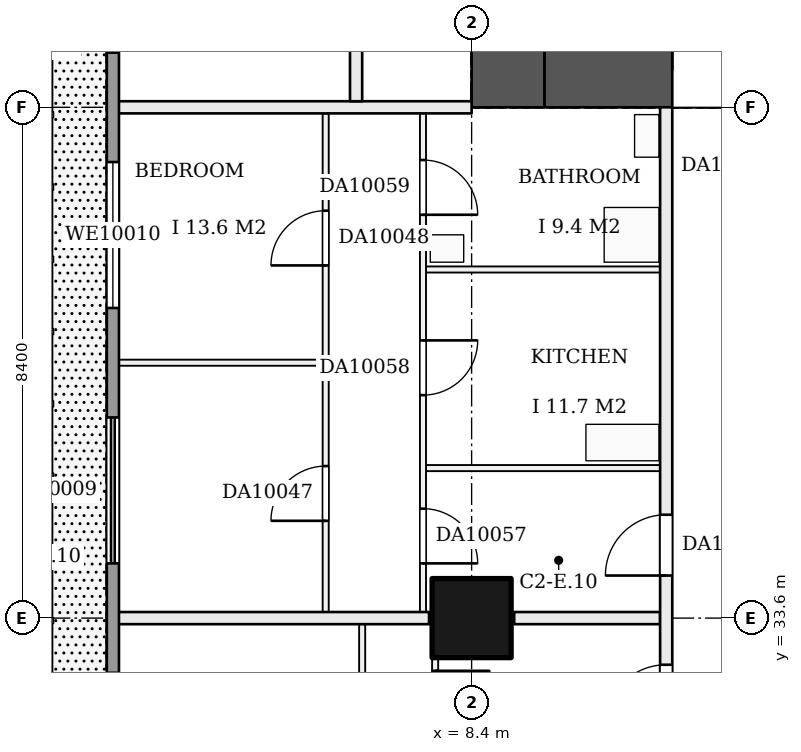
"""IFC4 building model, lengths in metres.
Left out: names, types, materials, properties, quantities, classifications, styles, units other than length and angle.
Written with IfcOpenShell. Run it as: python <this file> out.ifc"""

import sys

from ifc_helpers import new_model, si_unit, direction, frame, frame_2d, origin, origin_2d, place, context, subcontext, project, spatial, rectangle, extrude, element, fill, save


model = new_model("IFC4")
c1 = context("Model", 3, precision=1e-05, world=origin(), true_north=direction((0.0, 1.0)))
c2 = subcontext(c1, "Body", "Model", "MODEL_VIEW")
j1 = project(units=[si_unit("LENGTHUNIT", "METRE"), si_unit("PLANEANGLEUNIT", "RADIAN")], contexts=[c1])
p1 = place(None, origin())
s1 = spatial("IfcSite", under=j1, at=p1, CompositionType="ELEMENT")
p2 = place(p1, origin())
s2 = spatial("IfcBuilding", under=s1, at=p2, CompositionType="ELEMENT")
p3 = place(p2, frame((0.0, 0.0, 46.2)))
s3 = spatial("IfcBuildingStorey", under=s2, at=p3, CompositionType="ELEMENT", Elevation=46.2)
p4 = place(p3, frame((8.4, 33.6, 0.0), z_axis=(0.0, 0.0, 1.0), x_axis=(1.0, 0.0, 0.0)))
e1 = element("IfcColumn", 1, at=p4, inside=s3, PredefinedType="COLUMN", context=c2, shape_type="SweptSolid", body=[
    extrude(rectangle(XDim=1.3, YDim=1.3, at=origin_2d()), origin(), (0.0, 0.0, 1.0), 3.22),
])
p5 = place(p3, frame((9.0, 58.8, 0.0), z_axis=(0.0, 0.0, 1.0), x_axis=(0.0, -1.0, 0.0)))
e2 = element("IfcWall", 2, at=p5, inside=s3, PredefinedType="SHEAR", context=c2, shape_type="SweptSolid", body=[
    extrude(rectangle(XDim=16.8, YDim=1.2, at=frame_2d((8.4, 0.0))), origin(), (0.0, 0.0, 1.0), 3.22),
])
p6 = place(p5, frame((3.1, 0.0, 0.0)))
e3 = element("IfcOpeningElement", 3, at=p6, cuts=e2, PredefinedType="OPENING", context=c2, shape_type="SweptSolid", body=[
    extrude(rectangle(XDim=1.0, YDim=2.1, at=frame_2d((0.5, 1.05))), frame((0.0, 0.61, 0.0), z_axis=(0.0, -1.0, 0.0), x_axis=(1.0, 0.0, 0.0)), (0.0, 0.0, 1.0), 1.22),
])
p7 = place(p5, frame((12.7, 0.0, 0.0)))
e4 = element("IfcOpeningElement", 4, at=p7, cuts=e2, PredefinedType="OPENING", context=c2, shape_type="SweptSolid", body=[
    extrude(rectangle(XDim=1.0, YDim=2.1, at=frame_2d((0.5, 1.05))), frame((0.0, 0.61, 0.0), z_axis=(0.0, -1.0, 0.0), x_axis=(1.0, 0.0, 0.0)), (0.0, 0.0, 1.0), 1.22),
])
p8 = place(p3, frame((9.6, 42.6, 0.0), z_axis=(0.0, 0.0, 1.0), x_axis=(1.0, 0.0, 0.0)))
e5 = element("IfcWall", 5, at=p8, inside=s3, PredefinedType="SHEAR", context=c2, shape_type="SweptSolid", body=[
    extrude(rectangle(XDim=14.4, YDim=1.2, at=frame_2d((7.2, 0.0))), origin(), (0.0, 0.0, 1.0), 3.22),
])
p9 = place(p8, frame((2.1, 0.0, 0.0)))
e6 = element("IfcOpeningElement", 6, at=p9, cuts=e5, PredefinedType="OPENING", context=c2, shape_type="SweptSolid", body=[
    extrude(rectangle(XDim=1.8, YDim=2.1, at=frame_2d((0.9, 1.05))), frame((0.0, 0.61, 0.0), z_axis=(0.0, -1.0, 0.0), x_axis=(1.0, 0.0, 0.0)), (0.0, 0.0, 1.0), 1.22),
])
p10 = place(p3, frame((2.5, 33.6, 0.0), z_axis=(0.0, 0.0, 1.0), x_axis=(1.0, 0.0, 0.0)))
e7 = element("IfcWall", 7, at=p10, inside=s3, PredefinedType="PARTITIONING", context=c2, shape_type="SweptSolid", body=[
    extrude(rectangle(XDim=5.2, YDim=0.2, at=frame_2d((2.6, 0.0))), origin(), (0.0, 0.0, 1.0), 3.22),
])
p11 = place(p3, frame((9.1, 33.6, 0.0), z_axis=(0.0, 0.0, 1.0), x_axis=(1.0, 0.0, 0.0)))
e8 = element("IfcWall", 8, at=p11, inside=s3, PredefinedType="PARTITIONING", context=c2, shape_type="SweptSolid", body=[
    extrude(rectangle(XDim=2.4, YDim=0.2, at=frame_2d((1.2, 0.0))), origin(), (0.0, 0.0, 1.0), 3.22),
])
p12 = place(p3, frame((7.65, 36.067, 0.0), z_axis=(0.0, 0.0, 1.0), x_axis=(1.0, 0.0, 0.0)))
e9 = element("IfcWall", 9, at=p12, inside=s3, PredefinedType="PARTITIONING", context=c2, shape_type="SweptSolid", body=[
    extrude(rectangle(XDim=3.85, YDim=0.1, at=frame_2d((1.925, 0.0))), origin(), (0.0, 0.0, 1.0), 3.22),
])
p13 = place(p3, frame((2.5, 37.8, 0.0), z_axis=(0.0, 0.0, 1.0), x_axis=(1.0, 0.0, 0.0)))
e10 = element("IfcWall", 10, at=p13, inside=s3, PredefinedType="PARTITIONING", context=c2, shape_type="SweptSolid", body=[
    extrude(rectangle(XDim=3.45, YDim=0.1, at=frame_2d((1.725, 0.0))), origin(), (0.0, 0.0, 1.0), 3.22),
])
p14 = place(p3, frame((7.65, 39.333, 0.0), z_axis=(0.0, 0.0, 1.0), x_axis=(1.0, 0.0, 0.0)))
e11 = element("IfcWall", 11, at=p14, inside=s3, PredefinedType="PARTITIONING", context=c2, shape_type="SweptSolid", body=[
    extrude(rectangle(XDim=3.85, YDim=0.1, at=frame_2d((1.925, 0.0))), origin(), (0.0, 0.0, 1.0), 3.22),
])
p15 = place(p3, frame((2.5, 42.0, 0.0), z_axis=(0.0, 0.0, 1.0), x_axis=(1.0, 0.0, 0.0)))
e12 = element("IfcWall", 12, at=p15, inside=s3, PredefinedType="PARTITIONING", context=c2, shape_type="SweptSolid", body=[
    extrude(rectangle(XDim=5.9, YDim=0.2, at=frame_2d((2.95, 0.0))), origin(), (0.0, 0.0, 1.0), 3.22),
])
p16 = place(p3, frame((6.0, 33.7, 0.0), z_axis=(0.0, 0.0, 1.0), x_axis=(0.0, 1.0, 0.0)))
e13 = element("IfcWall", 13, at=p16, inside=s3, PredefinedType="PARTITIONING", context=c2, shape_type="SweptSolid", body=[
    extrude(rectangle(XDim=8.2, YDim=0.1, at=frame_2d((4.1, 0.0))), origin(), (0.0, 0.0, 1.0), 3.22),
])
p17 = place(p16, frame((1.5, 0.0, 0.0)))
e14 = element("IfcOpeningElement", 14, at=p17, cuts=e13, PredefinedType="OPENING", context=c2, shape_type="SweptSolid", body=[
    extrude(rectangle(XDim=0.9, YDim=2.1, at=frame_2d((0.45, 1.05))), frame((0.0, 0.06, 0.0), z_axis=(0.0, -1.0, 0.0), x_axis=(1.0, 0.0, 0.0)), (0.0, 0.0, 1.0), 0.12),
])
p18 = place(p16, frame((5.7, 0.0, 0.0)))
e15 = element("IfcOpeningElement", 15, at=p18, cuts=e13, PredefinedType="OPENING", context=c2, shape_type="SweptSolid", body=[
    extrude(rectangle(XDim=0.9, YDim=2.1, at=frame_2d((0.45, 1.05))), frame((0.0, 0.06, 0.0), z_axis=(0.0, -1.0, 0.0), x_axis=(1.0, 0.0, 0.0)), (0.0, 0.0, 1.0), 0.12),
])
p19 = place(p3, frame((6.5, 42.1, 0.0), z_axis=(0.0, 0.0, 1.0), x_axis=(0.0, 1.0, 0.0)))
e16 = element("IfcWall", 16, at=p19, inside=s3, PredefinedType="PARTITIONING", context=c2, shape_type="SweptSolid", body=[
    extrude(rectangle(XDim=14.2, YDim=0.2, at=frame_2d((7.1, 0.0))), origin(), (0.0, 0.0, 1.0), 3.22),
])
p20 = place(p19, frame((1.5, 0.0, 0.0)))
e17 = element("IfcOpeningElement", 17, at=p20, cuts=e16, PredefinedType="OPENING", context=c2, shape_type="SweptSolid", body=[
    extrude(rectangle(XDim=1.0, YDim=2.1, at=frame_2d((0.5, 1.05))), frame((0.0, 0.11, 0.0), z_axis=(0.0, -1.0, 0.0), x_axis=(1.0, 0.0, 0.0)), (0.0, 0.0, 1.0), 0.22),
])
p21 = place(p19, frame((6.7, 0.0, 0.0)))
e18 = element("IfcOpeningElement", 18, at=p21, cuts=e16, PredefinedType="OPENING", context=c2, shape_type="SweptSolid", body=[
    extrude(rectangle(XDim=1.0, YDim=2.1, at=frame_2d((0.5, 1.05))), frame((0.0, 0.11, 0.0), z_axis=(0.0, -1.0, 0.0), x_axis=(1.0, 0.0, 0.0)), (0.0, 0.0, 1.0), 0.22),
])
p22 = place(p3, frame((6.6, 25.3, 0.0), z_axis=(0.0, 0.0, 1.0), x_axis=(0.0, 1.0, 0.0)))
e19 = element("IfcWall", 19, at=p22, inside=s3, PredefinedType="PARTITIONING", context=c2, shape_type="SweptSolid", body=[
    extrude(rectangle(XDim=8.2, YDim=0.1, at=frame_2d((4.1, 0.0))), origin(), (0.0, 0.0, 1.0), 3.22),
])
p23 = place(p22, frame((1.5, 0.0, 0.0)))
e20 = element("IfcOpeningElement", 20, at=p23, cuts=e19, PredefinedType="OPENING", context=c2, shape_type="SweptSolid", body=[
    extrude(rectangle(XDim=0.9, YDim=2.1, at=frame_2d((0.45, 1.05))), frame((0.0, 0.06, 0.0), z_axis=(0.0, -1.0, 0.0), x_axis=(1.0, 0.0, 0.0)), (0.0, 0.0, 1.0), 0.12),
])
p24 = place(p22, frame((5.7, 0.0, 0.0)))
e21 = element("IfcOpeningElement", 21, at=p24, cuts=e19, PredefinedType="OPENING", context=c2, shape_type="SweptSolid", body=[
    extrude(rectangle(XDim=0.9, YDim=2.1, at=frame_2d((0.45, 1.05))), frame((0.0, 0.06, 0.0), z_axis=(0.0, -1.0, 0.0), x_axis=(1.0, 0.0, 0.0)), (0.0, 0.0, 1.0), 0.12),
])
p25 = place(p3, frame((7.6, 33.7, 0.0), z_axis=(0.0, 0.0, 1.0), x_axis=(0.0, 1.0, 0.0)))
e22 = element("IfcWall", 22, at=p25, inside=s3, PredefinedType="PARTITIONING", context=c2, shape_type="SweptSolid", body=[
    extrude(rectangle(XDim=8.2, YDim=0.1, at=frame_2d((4.1, 0.0))), origin(), (0.0, 0.0, 1.0), 3.22),
])
p26 = place(p25, frame((0.8, 0.0, 0.0)))
e23 = element("IfcOpeningElement", 23, at=p26, cuts=e22, PredefinedType="OPENING", context=c2, shape_type="SweptSolid", body=[
    extrude(rectangle(XDim=0.9, YDim=2.1, at=frame_2d((0.45, 1.05))), frame((0.0, 0.06, 0.0), z_axis=(0.0, -1.0, 0.0), x_axis=(1.0, 0.0, 0.0)), (0.0, 0.0, 1.0), 0.12),
])
p27 = place(p25, frame((3.567, 0.0, 0.0)))
e24 = element("IfcOpeningElement", 24, at=p27, cuts=e22, PredefinedType="OPENING", context=c2, shape_type="SweptSolid", body=[
    extrude(rectangle(XDim=0.9, YDim=2.1, at=frame_2d((0.45, 1.05))), frame((0.0, 0.06, 0.0), z_axis=(0.0, -1.0, 0.0), x_axis=(1.0, 0.0, 0.0)), (0.0, 0.0, 1.0), 0.12),
])
p28 = place(p25, frame((6.533, 0.0, 0.0)))
e25 = element("IfcOpeningElement", 25, at=p28, cuts=e22, PredefinedType="OPENING", context=c2, shape_type="SweptSolid", body=[
    extrude(rectangle(XDim=0.9, YDim=2.1, at=frame_2d((0.45, 1.05))), frame((0.0, 0.06, 0.0), z_axis=(0.0, -1.0, 0.0), x_axis=(1.0, 0.0, 0.0)), (0.0, 0.0, 1.0), 0.12),
])
p29 = place(p3, frame((7.8, 25.3, 0.0), z_axis=(0.0, 0.0, 1.0), x_axis=(0.0, 1.0, 0.0)))
e26 = element("IfcWall", 26, at=p29, inside=s3, PredefinedType="PARTITIONING", context=c2, shape_type="SweptSolid", body=[
    extrude(rectangle(XDim=8.2, YDim=0.1, at=frame_2d((4.1, 0.0))), origin(), (0.0, 0.0, 1.0), 3.22),
])
p30 = place(p29, frame((6.533, 0.0, 0.0)))
e27 = element("IfcOpeningElement", 27, at=p30, cuts=e26, PredefinedType="OPENING", context=c2, shape_type="SweptSolid", body=[
    extrude(rectangle(XDim=0.9, YDim=2.1, at=frame_2d((0.45, 1.05))), frame((0.0, 0.06, 0.0), z_axis=(0.0, -1.0, 0.0), x_axis=(1.0, 0.0, 0.0)), (0.0, 0.0, 1.0), 0.12),
])
p31 = place(p29, frame((0.8, 0.0, 0.0)))
e28 = element("IfcOpeningElement", 28, at=p31, cuts=e26, PredefinedType="OPENING", context=c2, shape_type="SweptSolid", body=[
    extrude(rectangle(XDim=0.9, YDim=2.1, at=frame_2d((0.45, 1.05))), frame((0.0, 0.06, 0.0), z_axis=(0.0, -1.0, 0.0), x_axis=(1.0, 0.0, 0.0)), (0.0, 0.0, 1.0), 0.12),
])
p32 = place(p29, frame((3.767, 0.0, 0.0)))
e29 = element("IfcOpeningElement", 29, at=p32, cuts=e26, PredefinedType="OPENING", context=c2, shape_type="SweptSolid", body=[
    extrude(rectangle(XDim=0.9, YDim=2.1, at=frame_2d((0.45, 1.05))), frame((0.0, 0.06, 0.0), z_axis=(0.0, -1.0, 0.0), x_axis=(1.0, 0.0, 0.0)), (0.0, 0.0, 1.0), 0.12),
])
p33 = place(p3, frame((11.6, 11.7, 0.0), z_axis=(0.0, 0.0, 1.0), x_axis=(0.0, 1.0, 0.0)))
e30 = element("IfcWall", 30, at=p33, inside=s3, PredefinedType="PARTITIONING", context=c2, shape_type="SweptSolid", body=[
    extrude(rectangle(XDim=30.3, YDim=0.2, at=frame_2d((15.15, 0.0))), origin(), (0.0, 0.0, 1.0), 3.22),
])
p34 = place(p33, frame((7.3, 0.0, 0.0)))
e31 = element("IfcOpeningElement", 31, at=p34, cuts=e30, PredefinedType="OPENING", context=c2, shape_type="SweptSolid", body=[
    extrude(rectangle(XDim=1.0, YDim=2.1, at=frame_2d((0.5, 1.05))), frame((0.0, 0.11, 0.0), z_axis=(0.0, -1.0, 0.0), x_axis=(1.0, 0.0, 0.0)), (0.0, 0.0, 1.0), 0.22),
])
p35 = place(p33, frame((20.133, 0.0, 0.0)))
e32 = element("IfcOpeningElement", 32, at=p35, cuts=e30, PredefinedType="OPENING", context=c2, shape_type="SweptSolid", body=[
    extrude(rectangle(XDim=1.0, YDim=2.1, at=frame_2d((0.5, 1.05))), frame((0.0, 0.11, 0.0), z_axis=(0.0, -1.0, 0.0), x_axis=(1.0, 0.0, 0.0)), (0.0, 0.0, 1.0), 0.22),
])
p36 = place(p33, frame((22.6, 0.0, 0.0)))
e33 = element("IfcOpeningElement", 33, at=p36, cuts=e30, PredefinedType="OPENING", context=c2, shape_type="SweptSolid", body=[
    extrude(rectangle(XDim=1.0, YDim=2.1, at=frame_2d((0.5, 1.05))), frame((0.0, 0.11, 0.0), z_axis=(0.0, -1.0, 0.0), x_axis=(1.0, 0.0, 0.0)), (0.0, 0.0, 1.0), 0.22),
])
p37 = place(p3, frame((2.5, 53.8, 0.0), z_axis=(0.0, 0.0, 1.0), x_axis=(0.0, -1.0, 0.0)))
e34 = element("IfcWall", 34, at=p37, inside=s3, PredefinedType="SOLIDWALL", context=c2, shape_type="SweptSolid", body=[
    extrude(rectangle(XDim=48.8, YDim=0.2, at=frame_2d((24.4, 0.0))), origin(), (0.0, 0.0, 1.0), 3.22),
])
p38 = place(p37, frame((46.1, 0.0, 0.0)))
e35 = element("IfcOpeningElement", 35, at=p38, cuts=e34, PredefinedType="OPENING", context=c2, shape_type="SweptSolid", body=[
    extrude(rectangle(XDim=2.4, YDim=2.2, at=frame_2d((1.2, 1.1))), frame((0.0, 0.11, 0.0), z_axis=(0.0, -1.0, 0.0), x_axis=(1.0, 0.0, 0.0)), (0.0, 0.0, 1.0), 0.22),
])
p39 = place(p37, frame((42.1, 0.0, 0.0)))
e36 = element("IfcOpeningElement", 36, at=p39, cuts=e34, PredefinedType="OPENING", context=c2, shape_type="SweptSolid", body=[
    extrude(rectangle(XDim=2.4, YDim=2.2, at=frame_2d((1.2, 1.1))), frame((0.0, 0.11, 0.0), z_axis=(0.0, -1.0, 0.0), x_axis=(1.0, 0.0, 0.0)), (0.0, 0.0, 1.0), 0.22),
])
p40 = place(p37, frame((37.9, 0.0, 0.0)))
e37 = element("IfcOpeningElement", 37, at=p40, cuts=e34, PredefinedType="OPENING", context=c2, shape_type="SweptSolid", body=[
    extrude(rectangle(XDim=2.4, YDim=2.2, at=frame_2d((1.2, 1.1))), frame((0.0, 0.11, 0.0), z_axis=(0.0, -1.0, 0.0), x_axis=(1.0, 0.0, 0.0)), (0.0, 0.0, 1.0), 0.22),
])
p41 = place(p37, frame((33.7, 0.0, 0.0)))
e38 = element("IfcOpeningElement", 38, at=p41, cuts=e34, PredefinedType="OPENING", context=c2, shape_type="SweptSolid", body=[
    extrude(rectangle(XDim=2.4, YDim=2.2, at=frame_2d((1.2, 1.1))), frame((0.0, 0.11, 0.0), z_axis=(0.0, -1.0, 0.0), x_axis=(1.0, 0.0, 0.0)), (0.0, 0.0, 1.0), 0.22),
])
p42 = place(p37, frame((29.5, 0.0, 0.9)))
e39 = element("IfcOpeningElement", 39, at=p42, cuts=e34, PredefinedType="OPENING", context=c2, shape_type="SweptSolid", body=[
    extrude(rectangle(XDim=2.4, YDim=1.5, at=frame_2d((1.2, 0.75))), frame((0.0, 0.11, 0.0), z_axis=(0.0, -1.0, 0.0), x_axis=(1.0, 0.0, 0.0)), (0.0, 0.0, 1.0), 0.22),
])
p43 = place(p37, frame((25.3, 0.0, 0.9)))
e40 = element("IfcOpeningElement", 40, at=p43, cuts=e34, PredefinedType="OPENING", context=c2, shape_type="SweptSolid", body=[
    extrude(rectangle(XDim=2.4, YDim=1.5, at=frame_2d((1.2, 0.75))), frame((0.0, 0.11, 0.0), z_axis=(0.0, -1.0, 0.0), x_axis=(1.0, 0.0, 0.0)), (0.0, 0.0, 1.0), 0.22),
])
p44 = place(p37, frame((21.1, 0.0, 0.0)))
e41 = element("IfcOpeningElement", 41, at=p44, cuts=e34, PredefinedType="OPENING", context=c2, shape_type="SweptSolid", body=[
    extrude(rectangle(XDim=2.4, YDim=2.2, at=frame_2d((1.2, 1.1))), frame((0.0, 0.11, 0.0), z_axis=(0.0, -1.0, 0.0), x_axis=(1.0, 0.0, 0.0)), (0.0, 0.0, 1.0), 0.22),
])
p45 = place(p37, frame((16.9, 0.0, 0.0)))
e42 = element("IfcOpeningElement", 42, at=p45, cuts=e34, PredefinedType="OPENING", context=c2, shape_type="SweptSolid", body=[
    extrude(rectangle(XDim=2.4, YDim=2.2, at=frame_2d((1.2, 1.1))), frame((0.0, 0.11, 0.0), z_axis=(0.0, -1.0, 0.0), x_axis=(1.0, 0.0, 0.0)), (0.0, 0.0, 1.0), 0.22),
])
p46 = place(p37, frame((12.7, 0.0, 0.9)))
e43 = element("IfcOpeningElement", 43, at=p46, cuts=e34, PredefinedType="OPENING", context=c2, shape_type="SweptSolid", body=[
    extrude(rectangle(XDim=2.4, YDim=1.5, at=frame_2d((1.2, 0.75))), frame((0.0, 0.11, 0.0), z_axis=(0.0, -1.0, 0.0), x_axis=(1.0, 0.0, 0.0)), (0.0, 0.0, 1.0), 0.22),
])
p47 = place(p37, frame((8.5, 0.0, 0.9)))
e44 = element("IfcOpeningElement", 44, at=p47, cuts=e34, PredefinedType="OPENING", context=c2, shape_type="SweptSolid", body=[
    extrude(rectangle(XDim=2.4, YDim=1.5, at=frame_2d((1.2, 0.75))), frame((0.0, 0.11, 0.0), z_axis=(0.0, -1.0, 0.0), x_axis=(1.0, 0.0, 0.0)), (0.0, 0.0, 1.0), 0.22),
])
p48 = place(p37, frame((4.3, 0.0, 0.9)))
e45 = element("IfcOpeningElement", 45, at=p48, cuts=e34, PredefinedType="OPENING", context=c2, shape_type="SweptSolid", body=[
    extrude(rectangle(XDim=2.4, YDim=1.5, at=frame_2d((1.2, 0.75))), frame((0.0, 0.11, 0.0), z_axis=(0.0, -1.0, 0.0), x_axis=(1.0, 0.0, 0.0)), (0.0, 0.0, 1.0), 0.22),
])
p49 = place(p37, frame((0.3, 0.0, 0.0)))
e46 = element("IfcOpeningElement", 46, at=p49, cuts=e34, PredefinedType="OPENING", context=c2, shape_type="SweptSolid", body=[
    extrude(rectangle(XDim=2.4, YDim=2.2, at=frame_2d((1.2, 1.1))), frame((0.0, 0.11, 0.0), z_axis=(0.0, -1.0, 0.0), x_axis=(1.0, 0.0, 0.0)), (0.0, 0.0, 1.0), 0.22),
])
p50 = place(p9, origin())
e47 = element("IfcDoor", 47, at=p50, inside=s3, OperationType="DOUBLE_DOOR_SINGLE_SWING", PredefinedType="DOOR", context=c2, shape_type="SweptSolid", body=[
    extrude(rectangle(XDim=1.8, YDim=2.1, at=frame_2d((0.9, 1.05))), frame((0.0, 0.025, 0.0), z_axis=(0.0, -1.0, 0.0), x_axis=(1.0, 0.0, 0.0)), (0.0, 0.0, 1.0), 0.05),
])
fill(e6, e47)
p51 = place(p17, origin())
e48 = element("IfcDoor", 48, at=p51, inside=s3, OperationType="SINGLE_SWING_LEFT", PredefinedType="DOOR", context=c2, shape_type="SweptSolid", body=[
    extrude(rectangle(XDim=0.9, YDim=2.1, at=frame_2d((0.45, 1.05))), frame((0.0, 0.025, 0.0), z_axis=(0.0, -1.0, 0.0), x_axis=(1.0, 0.0, 0.0)), (0.0, 0.0, 1.0), 0.05),
])
fill(e14, e48)
p52 = place(p18, origin())
e49 = element("IfcDoor", 49, at=p52, inside=s3, OperationType="SINGLE_SWING_LEFT", PredefinedType="DOOR", context=c2, shape_type="SweptSolid", body=[
    extrude(rectangle(XDim=0.9, YDim=2.1, at=frame_2d((0.45, 1.05))), frame((0.0, 0.025, 0.0), z_axis=(0.0, -1.0, 0.0), x_axis=(1.0, 0.0, 0.0)), (0.0, 0.0, 1.0), 0.05),
])
fill(e15, e49)
p53 = place(p26, frame((0.9, 0.0, 0.0), z_axis=(0.0, 0.0, 1.0), x_axis=(-1.0, 0.0, 0.0)))
e50 = element("IfcDoor", 50, at=p53, inside=s3, OperationType="SINGLE_SWING_RIGHT", PredefinedType="DOOR", context=c2, shape_type="SweptSolid", body=[
    extrude(rectangle(XDim=0.9, YDim=2.1, at=frame_2d((0.45, 1.05))), frame((0.0, 0.025, 0.0), z_axis=(0.0, -1.0, 0.0), x_axis=(1.0, 0.0, 0.0)), (0.0, 0.0, 1.0), 0.05),
])
fill(e23, e50)
p54 = place(p27, frame((0.9, 0.0, 0.0), z_axis=(0.0, 0.0, 1.0), x_axis=(-1.0, 0.0, 0.0)))
e51 = element("IfcDoor", 51, at=p54, inside=s3, OperationType="SINGLE_SWING_LEFT", PredefinedType="DOOR", context=c2, shape_type="SweptSolid", body=[
    extrude(rectangle(XDim=0.9, YDim=2.1, at=frame_2d((0.45, 1.05))), frame((0.0, 0.025, 0.0), z_axis=(0.0, -1.0, 0.0), x_axis=(1.0, 0.0, 0.0)), (0.0, 0.0, 1.0), 0.05),
])
fill(e24, e51)
p55 = place(p28, frame((0.9, 0.0, 0.0), z_axis=(0.0, 0.0, 1.0), x_axis=(-1.0, 0.0, 0.0)))
e52 = element("IfcDoor", 52, at=p55, inside=s3, OperationType="SINGLE_SWING_RIGHT", PredefinedType="DOOR", context=c2, shape_type="SweptSolid", body=[
    extrude(rectangle(XDim=0.9, YDim=2.1, at=frame_2d((0.45, 1.05))), frame((0.0, 0.025, 0.0), z_axis=(0.0, -1.0, 0.0), x_axis=(1.0, 0.0, 0.0)), (0.0, 0.0, 1.0), 0.05),
])
fill(e25, e52)
p56 = place(p30, frame((0.9, 0.0, 0.0), z_axis=(0.0, 0.0, 1.0), x_axis=(-1.0, 0.0, 0.0)))
e53 = element("IfcDoor", 53, at=p56, inside=s3, OperationType="SINGLE_SWING_LEFT", PredefinedType="DOOR", context=c2, shape_type="SweptSolid", body=[
    extrude(rectangle(XDim=0.9, YDim=2.1, at=frame_2d((0.45, 1.05))), frame((0.0, 0.025, 0.0), z_axis=(0.0, -1.0, 0.0), x_axis=(1.0, 0.0, 0.0)), (0.0, 0.0, 1.0), 0.05),
])
fill(e27, e53)
p57 = place(p35, origin())
e54 = element("IfcDoor", 54, at=p57, inside=s3, OperationType="SINGLE_SWING_LEFT", PredefinedType="DOOR", context=c2, shape_type="SweptSolid", body=[
    extrude(rectangle(XDim=1.0, YDim=2.1, at=frame_2d((0.5, 1.05))), frame((0.0, 0.025, 0.0), z_axis=(0.0, -1.0, 0.0), x_axis=(1.0, 0.0, 0.0)), (0.0, 0.0, 1.0), 0.05),
])
fill(e32, e54)
p58 = place(p36, origin())
e55 = element("IfcDoor", 55, at=p58, inside=s3, OperationType="SINGLE_SWING_LEFT", PredefinedType="DOOR", context=c2, shape_type="SweptSolid", body=[
    extrude(rectangle(XDim=1.0, YDim=2.1, at=frame_2d((0.5, 1.05))), frame((0.0, 0.025, 0.0), z_axis=(0.0, -1.0, 0.0), x_axis=(1.0, 0.0, 0.0)), (0.0, 0.0, 1.0), 0.05),
])
fill(e33, e55)
p59 = place(p45, origin())
e56 = element("IfcDoor", 56, at=p59, inside=s3, OperationType="DOUBLE_DOOR_SLIDING", PredefinedType="DOOR", context=c2, shape_type="SweptSolid", body=[
    extrude(rectangle(XDim=2.4, YDim=2.2, at=frame_2d((1.2, 1.1))), frame((0.0, 0.025, 0.0), z_axis=(0.0, -1.0, 0.0), x_axis=(1.0, 0.0, 0.0)), (0.0, 0.0, 1.0), 0.05),
])
fill(e42, e56)
p60 = place(p46, origin())
e57 = element("IfcWindow", 57, at=p60, inside=s3, PartitioningType="SINGLE_PANEL", PredefinedType="WINDOW", context=c2, shape_type="SweptSolid", body=[
    extrude(rectangle(XDim=2.4, YDim=1.5, at=frame_2d((1.2, 0.75))), frame((0.0, 0.03, 0.0), z_axis=(0.0, -1.0, 0.0), x_axis=(1.0, 0.0, 0.0)), (0.0, 0.0, 1.0), 0.06),
])
fill(e43, e57)
save(model, sys.argv[1])
